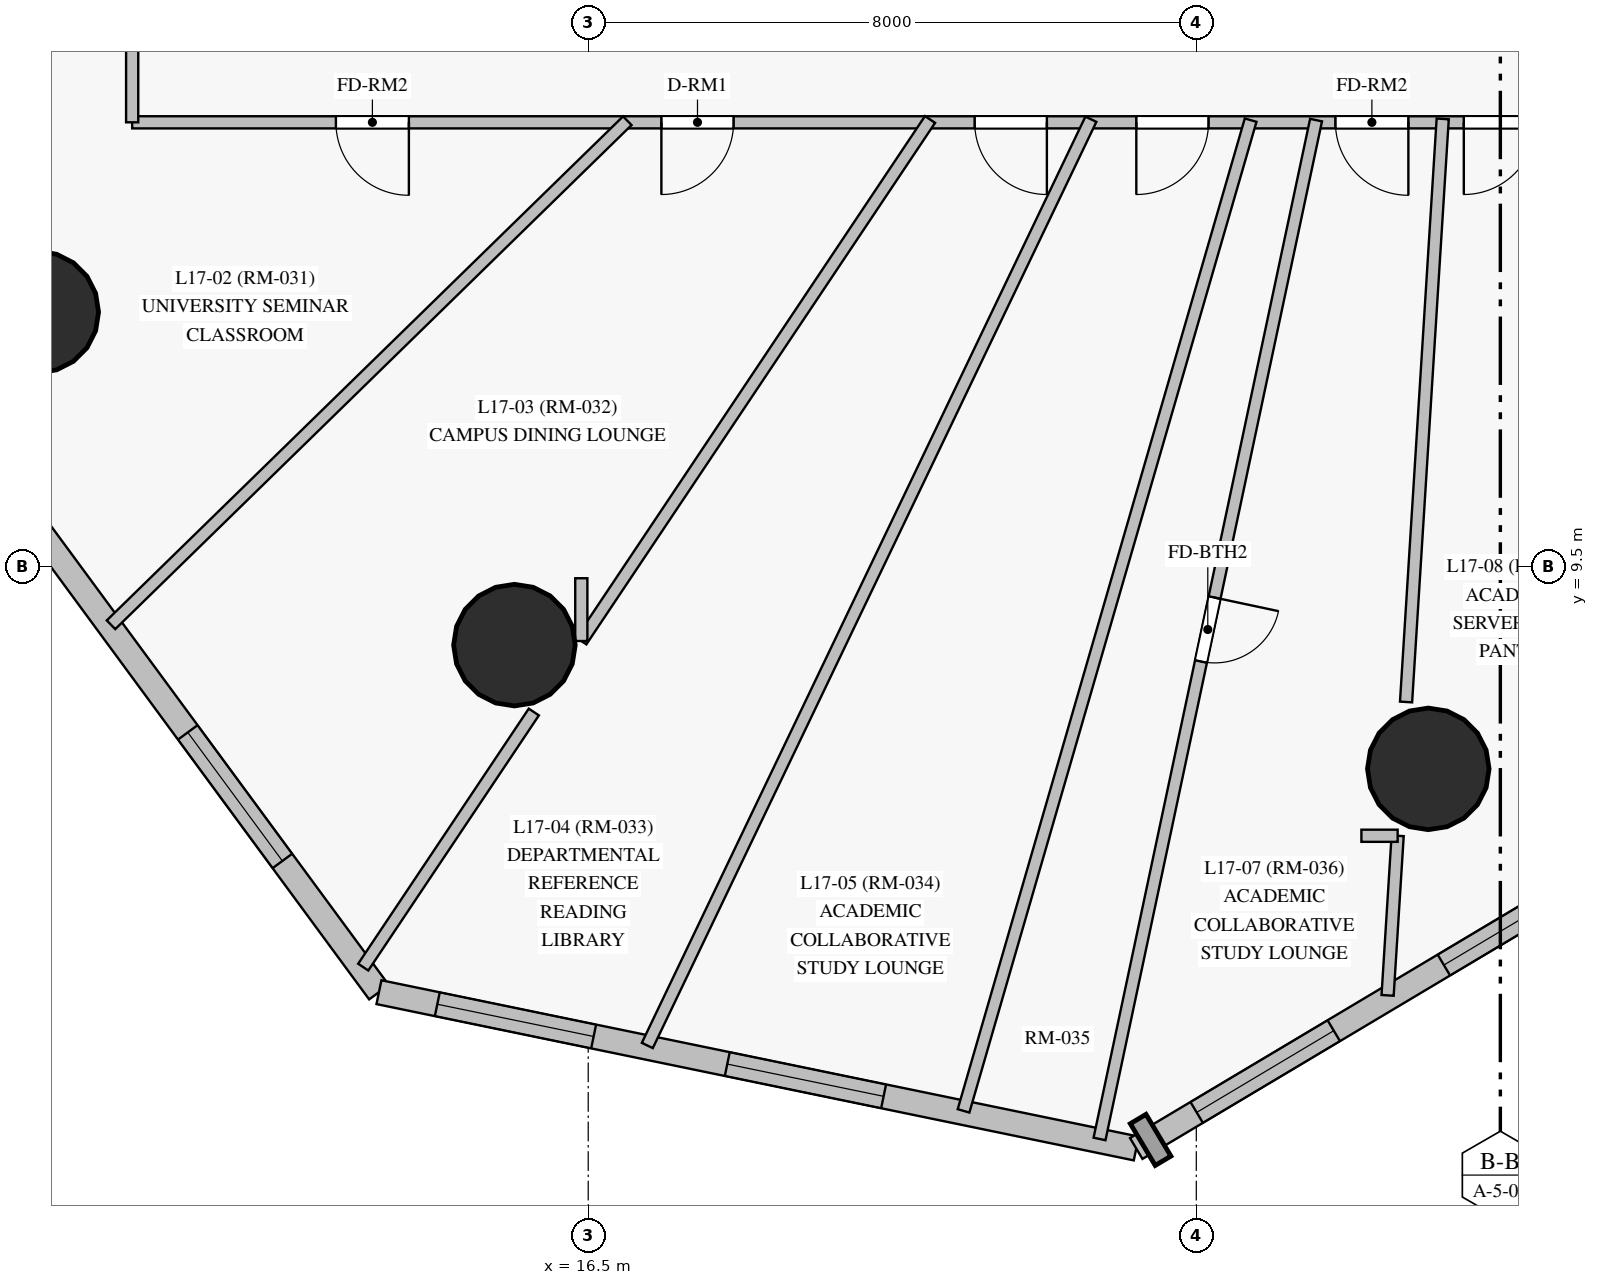
"""IFC4 building model, lengths in metres.
Left out: names, types, materials, properties, quantities, classifications, styles, units other than length and angle.
Written with IfcOpenShell. Run it as: python <this file> out.ifc"""

import sys

from ifc_helpers import new_model, si_unit, direction, frame, frame_2d, origin, origin_with_axes, origin_2d, place, context, subcontext, project, spatial, rectangle, circle, extrude, source, transform, mapped, element, fill, save


model = new_model("IFC4")
c1 = context("Model", 3, precision=1e-05, world=origin(), true_north=direction((0.0, 1.0)))
c2 = subcontext(c1, "Body", "Model", "MODEL_VIEW")
j1 = project(units=[si_unit("LENGTHUNIT", "METRE"), si_unit("PLANEANGLEUNIT", "RADIAN")], contexts=[c1])
p1 = place(None, origin())
s1 = spatial("IfcSite", under=j1, at=p1, CompositionType="ELEMENT")
p2 = place(p1, origin())
s2 = spatial("IfcBuilding", under=s1, at=p2, CompositionType="ELEMENT")
p3 = place(p2, frame((0.0, 0.0, 66.1)))
s3 = spatial("IfcBuildingStorey", under=s2, at=p3, CompositionType="ELEMENT", Elevation=66.1)
m1 = source(origin_with_axes(), c2, "Body", "SweptSolid", [
    extrude(circle(Radius=0.8, at=origin_2d()), origin(), (0.0, 0.0, 1.0), 3.6),
])
for number, where, z_axis, x_axis in (
    (1, (9.258, 12.854, 0.0), (0.0, 0.0, 1.0), (1.0, 0.0, 0.0)),
    (2, (15.529, 8.472, 0.0), (0.0, 0.0, 1.0), (1.0, 0.0, 0.0)),
    (3, (27.552, 6.844, 0.0), (0.0, 0.0, 1.0), (1.0, 0.0, 0.0)),
):
    element("IfcColumn", number, at=place(p3, frame(where, z_axis=z_axis, x_axis=x_axis)), inside=s3, PredefinedType="COLUMN", context=c2, shape_type="MappedRepresentation", body=[
        mapped(m1, transform((0.0, 0.0, 0.0), scale=1.0)),
    ])
p4 = place(p3, frame((6.235, 14.114, 0.0), z_axis=(0.0, 0.0, 1.0), x_axis=(0.59272320353, -0.805406235385, 0.0)))
e4 = element("IfcWall", 4, at=p4, inside=s3, PredefinedType="SOLIDWALL", context=c2, shape_type="SweptSolid", body=[
    extrude(rectangle(XDim=12.674, YDim=0.32, at=frame_2d((6.337, 0.0))), origin(), (0.0, 0.0, 1.0), 3.35),
])
p5 = place(p4, frame((2.323, 0.0, 0.85)))
e5 = element("IfcOpeningElement", 5, at=p5, cuts=e4, PredefinedType="OPENING", context=c2, shape_type="SweptSolid", body=[
    extrude(rectangle(XDim=2.1, YDim=1.95, at=frame_2d((1.05, 0.975))), frame((0.0, 0.17, 0.0), z_axis=(0.0, -1.0, 0.0), x_axis=(1.0, 0.0, 0.0)), (0.0, 0.0, 1.0), 0.34),
])
p6 = place(p4, frame((8.431, 0.0, 0.85)))
e6 = element("IfcOpeningElement", 6, at=p6, cuts=e4, PredefinedType="OPENING", context=c2, shape_type="SweptSolid", body=[
    extrude(rectangle(XDim=2.1, YDim=1.95, at=frame_2d((1.05, 0.975))), frame((0.0, 0.17, 0.0), z_axis=(0.0, -1.0, 0.0), x_axis=(1.0, 0.0, 0.0)), (0.0, 0.0, 1.0), 0.34),
])
p7 = place(p3, frame((13.747, 3.906, 0.0), z_axis=(0.0, 0.0, 1.0), x_axis=(0.979361436672, -0.202116739436, 0.0)))
e7 = element("IfcWall", 7, at=p7, inside=s3, PredefinedType="SOLIDWALL", context=c2, shape_type="SweptSolid", body=[
    extrude(rectangle(XDim=10.173, YDim=0.32, at=frame_2d((5.086, 0.0))), origin(), (0.0, 0.0, 1.0), 3.35),
])
p8 = place(p7, frame((0.784, 0.0, 0.85)))
e8 = element("IfcOpeningElement", 8, at=p8, cuts=e7, PredefinedType="OPENING", context=c2, shape_type="SweptSolid", body=[
    extrude(rectangle(XDim=2.1, YDim=1.95, at=frame_2d((1.05, 0.975))), frame((0.0, 0.17, 0.0), z_axis=(0.0, -1.0, 0.0), x_axis=(1.0, 0.0, 0.0)), (0.0, 0.0, 1.0), 0.34),
])
p9 = place(p7, frame((4.679, 0.0, 0.85)))
e9 = element("IfcOpeningElement", 9, at=p9, cuts=e7, PredefinedType="OPENING", context=c2, shape_type="SweptSolid", body=[
    extrude(rectangle(XDim=2.1, YDim=1.95, at=frame_2d((1.05, 0.975))), frame((0.0, 0.17, 0.0), z_axis=(0.0, -1.0, 0.0), x_axis=(1.0, 0.0, 0.0)), (0.0, 0.0, 1.0), 0.34),
])
p10 = place(p3, frame((23.71, 1.85, 0.0), z_axis=(0.0, 0.0, 1.0), x_axis=(0.858916766564, 0.512115209806, 0.0)))
e10 = element("IfcWall", 10, at=p10, inside=s3, PredefinedType="SOLIDWALL", context=c2, shape_type="SweptSolid", body=[
    extrude(rectangle(XDim=15.245, YDim=0.32, at=frame_2d((7.623, 0.0))), origin(), (0.0, 0.0, 1.0), 3.35),
])
p11 = place(p10, frame((0.926, 0.0, 0.85)))
e11 = element("IfcOpeningElement", 11, at=p11, cuts=e10, PredefinedType="OPENING", context=c2, shape_type="SweptSolid", body=[
    extrude(rectangle(XDim=2.1, YDim=1.95, at=frame_2d((1.05, 0.975))), frame((0.0, 0.17, 0.0), z_axis=(0.0, -1.0, 0.0), x_axis=(1.0, 0.0, 0.0)), (0.0, 0.0, 1.0), 0.34),
])
p12 = place(p10, frame((4.712, 0.0, 0.85)))
e12 = element("IfcOpeningElement", 12, at=p12, cuts=e10, PredefinedType="OPENING", context=c2, shape_type="SweptSolid", body=[
    extrude(rectangle(XDim=2.1, YDim=1.95, at=frame_2d((1.05, 0.975))), frame((0.0, 0.17, 0.0), z_axis=(0.0, -1.0, 0.0), x_axis=(1.0, 0.0, 0.0)), (0.0, 0.0, 1.0), 0.34),
])
p13 = place(p10, frame((8.631, 0.0, 0.85)))
e13 = element("IfcOpeningElement", 13, at=p13, cuts=e10, PredefinedType="OPENING", context=c2, shape_type="SweptSolid", body=[
    extrude(rectangle(XDim=2.1, YDim=1.95, at=frame_2d((1.05, 0.975))), frame((0.0, 0.17, 0.0), z_axis=(0.0, -1.0, 0.0), x_axis=(1.0, 0.0, 0.0)), (0.0, 0.0, 1.0), 0.34),
])
p14 = place(p10, frame((12.087, 0.0, 0.85)))
e14 = element("IfcOpeningElement", 14, at=p14, cuts=e10, PredefinedType="OPENING", context=c2, shape_type="SweptSolid", body=[
    extrude(rectangle(XDim=2.1, YDim=1.95, at=frame_2d((1.05, 0.975))), frame((0.0, 0.17, 0.0), z_axis=(0.0, -1.0, 0.0), x_axis=(1.0, 0.0, 0.0)), (0.0, 0.0, 1.0), 0.34),
])
p15 = place(p3, frame((40.25, 15.35, 0.0), z_axis=(0.0, 0.0, 1.0), x_axis=(-1.0, 0.0, 0.0)))
e15 = element("IfcWall", 15, at=p15, inside=s3, PredefinedType="PARTITIONING", context=c2, shape_type="SweptSolid", body=[
    extrude(rectangle(XDim=29.75, YDim=0.16, at=frame_2d((14.875, 0.0))), origin(), (0.0, 0.0, 1.0), 2.7),
])
p16 = place(p15, frame((26.11, 0.0, 0.0)))
e16 = element("IfcOpeningElement", 16, at=p16, cuts=e15, PredefinedType="OPENING", context=c2, shape_type="SweptSolid", body=[
    extrude(rectangle(XDim=0.96, YDim=2.15, at=frame_2d((0.48, 1.075))), frame((0.0, 0.09, 0.0), z_axis=(0.0, -1.0, 0.0), x_axis=(1.0, 0.0, 0.0)), (0.0, 0.0, 1.0), 0.18),
])
p17 = place(p15, frame((21.837, 0.0, 0.0)))
e17 = element("IfcOpeningElement", 17, at=p17, cuts=e15, PredefinedType="OPENING", context=c2, shape_type="SweptSolid", body=[
    extrude(rectangle(XDim=0.95, YDim=2.15, at=frame_2d((0.475, 1.075))), frame((0.0, 0.09, 0.0), z_axis=(0.0, -1.0, 0.0), x_axis=(1.0, 0.0, 0.0)), (0.0, 0.0, 1.0), 0.18),
])
p18 = place(p15, frame((17.716, 0.0, 0.0)))
e18 = element("IfcOpeningElement", 18, at=p18, cuts=e15, PredefinedType="OPENING", context=c2, shape_type="SweptSolid", body=[
    extrude(rectangle(XDim=0.95, YDim=2.15, at=frame_2d((0.475, 1.075))), frame((0.0, 0.09, 0.0), z_axis=(0.0, -1.0, 0.0), x_axis=(1.0, 0.0, 0.0)), (0.0, 0.0, 1.0), 0.18),
])
p19 = place(p15, frame((15.589, 0.0, 0.0)))
e19 = element("IfcOpeningElement", 19, at=p19, cuts=e15, PredefinedType="OPENING", context=c2, shape_type="SweptSolid", body=[
    extrude(rectangle(XDim=0.95, YDim=2.15, at=frame_2d((0.475, 1.075))), frame((0.0, 0.09, 0.0), z_axis=(0.0, -1.0, 0.0), x_axis=(1.0, 0.0, 0.0)), (0.0, 0.0, 1.0), 0.18),
])
p20 = place(p15, frame((12.96, 0.0, 0.0)))
e20 = element("IfcOpeningElement", 20, at=p20, cuts=e15, PredefinedType="OPENING", context=c2, shape_type="SweptSolid", body=[
    extrude(rectangle(XDim=0.96, YDim=2.15, at=frame_2d((0.48, 1.075))), frame((0.0, 0.09, 0.0), z_axis=(0.0, -1.0, 0.0), x_axis=(1.0, 0.0, 0.0)), (0.0, 0.0, 1.0), 0.18),
])
p21 = place(p15, frame((11.281, 0.0, 0.0)))
e21 = element("IfcOpeningElement", 21, at=p21, cuts=e15, PredefinedType="OPENING", context=c2, shape_type="SweptSolid", body=[
    extrude(rectangle(XDim=0.95, YDim=2.15, at=frame_2d((0.475, 1.075))), frame((0.0, 0.09, 0.0), z_axis=(0.0, -1.0, 0.0), x_axis=(1.0, 0.0, 0.0)), (0.0, 0.0, 1.0), 0.18),
])
p22 = place(p15, frame((9.601, 0.0, 0.0)))
e22 = element("IfcOpeningElement", 22, at=p22, cuts=e15, PredefinedType="OPENING", context=c2, shape_type="SweptSolid", body=[
    extrude(rectangle(XDim=0.96, YDim=2.15, at=frame_2d((0.48, 1.075))), frame((0.0, 0.09, 0.0), z_axis=(0.0, -1.0, 0.0), x_axis=(1.0, 0.0, 0.0)), (0.0, 0.0, 1.0), 0.18),
])
p23 = place(p15, frame((8.498, 0.0, 0.0)))
e23 = element("IfcOpeningElement", 23, at=p23, cuts=e15, PredefinedType="OPENING", context=c2, shape_type="SweptSolid", body=[
    extrude(rectangle(XDim=0.95, YDim=2.15, at=frame_2d((0.475, 1.075))), frame((0.0, 0.09, 0.0), z_axis=(0.0, -1.0, 0.0), x_axis=(1.0, 0.0, 0.0)), (0.0, 0.0, 1.0), 0.18),
])
p24 = place(p15, frame((2.634, 0.0, 0.0)))
e24 = element("IfcOpeningElement", 24, at=p24, cuts=e15, PredefinedType="OPENING", context=c2, shape_type="SweptSolid", body=[
    extrude(rectangle(XDim=0.95, YDim=2.15, at=frame_2d((0.475, 1.075))), frame((0.0, 0.09, 0.0), z_axis=(0.0, -1.0, 0.0), x_axis=(1.0, 0.0, 0.0)), (0.0, 0.0, 1.0), 0.18),
])
p25 = place(p3, frame((10.5, 15.35, 0.0), z_axis=(0.0, 0.0, 1.0), x_axis=(0.0, 1.0, 0.0)))
e25 = element("IfcWall", 25, at=p25, inside=s3, PredefinedType="PARTITIONING", context=c2, shape_type="SweptSolid", body=[
    extrude(rectangle(XDim=22.3, YDim=0.16, at=frame_2d((11.15, 0.0))), origin(), (0.0, 0.0, 1.0), 2.75),
])
p26 = place(p25, frame((7.33, 0.0, 0.0)))
e26 = element("IfcOpeningElement", 26, at=p26, cuts=e25, PredefinedType="OPENING", context=c2, shape_type="SweptSolid", body=[
    extrude(rectangle(XDim=0.95, YDim=2.15, at=frame_2d((0.475, 1.075))), frame((0.0, 0.09, 0.0), z_axis=(0.0, -1.0, 0.0), x_axis=(1.0, 0.0, 0.0)), (0.0, 0.0, 1.0), 0.18),
])
p27 = place(p25, frame((16.25, 0.0, 0.0)))
e27 = element("IfcOpeningElement", 27, at=p27, cuts=e25, PredefinedType="OPENING", context=c2, shape_type="SweptSolid", body=[
    extrude(rectangle(XDim=0.96, YDim=2.15, at=frame_2d((0.48, 1.075))), frame((0.0, 0.09, 0.0), z_axis=(0.0, -1.0, 0.0), x_axis=(1.0, 0.0, 0.0)), (0.0, 0.0, 1.0), 0.18),
])
p28 = place(p25, frame((10.675, 0.0, 0.0)))
e28 = element("IfcOpeningElement", 28, at=p28, cuts=e25, PredefinedType="OPENING", context=c2, shape_type="SweptSolid", body=[
    extrude(rectangle(XDim=0.95, YDim=2.15, at=frame_2d((0.475, 1.075))), frame((0.0, 0.09, 0.0), z_axis=(0.0, -1.0, 0.0), x_axis=(1.0, 0.0, 0.0)), (0.0, 0.0, 1.0), 0.18),
])
p29 = place(p3, frame((26.075, 15.379, 0.0), z_axis=(0.0, 0.0, 1.0), x_axis=(-0.207877719797, -0.978154820881, 0.0)))
e29 = element("IfcWall", 29, at=p29, inside=s3, PredefinedType="PARTITIONING", context=c2, shape_type="SweptSolid", body=[
    extrude(rectangle(XDim=13.703, YDim=0.16, at=frame_2d((6.852, 0.0))), origin(), (0.0, 0.0, 1.0), 3.35),
])
p30 = place(p29, frame((6.422, 0.0, 0.0)))
e30 = element("IfcOpeningElement", 30, at=p30, cuts=e29, PredefinedType="OPENING", context=c2, shape_type="SweptSolid", body=[
    extrude(rectangle(XDim=0.86, YDim=2.04, at=frame_2d((0.43, 1.02))), frame((0.0, 0.09, 0.0), z_axis=(0.0, -1.0, 0.0), x_axis=(1.0, 0.0, 0.0)), (0.0, 0.0, 1.0), 0.18),
])
p31 = place(p3, frame((25.215, 15.379, 0.0), z_axis=(0.0, 0.0, 1.0), x_axis=(-0.278333270269, -0.960484560345, 0.0)))
e31 = element("IfcWall", 31, at=p31, inside=s3, PredefinedType="PARTITIONING", context=c2, shape_type="SweptSolid", body=[
    extrude(rectangle(XDim=13.57, YDim=0.16, at=frame_2d((6.785, 0.0))), origin(), (0.0, 0.0, 1.0), 3.35),
])
p32 = place(p3, frame((23.113, 15.391, 0.0), z_axis=(0.0, 0.0, 1.0), x_axis=(-0.431926675658, -0.901908724237, 0.0)))
e32 = element("IfcWall", 32, at=p32, inside=s3, PredefinedType="PARTITIONING", context=c2, shape_type="SweptSolid", body=[
    extrude(rectangle(XDim=13.511, YDim=0.16, at=frame_2d((6.755, 0.0))), origin(), (0.0, 0.0, 1.0), 3.35),
])
p33 = place(p3, frame((17.014, 15.371, 0.0), z_axis=(0.0, 0.0, 1.0), x_axis=(-0.715555534785, -0.698555850765, 0.0)))
e33 = element("IfcWall", 33, at=p33, inside=s3, PredefinedType="PARTITIONING", context=c2, shape_type="SweptSolid", body=[
    extrude(rectangle(XDim=9.493, YDim=0.16, at=frame_2d((4.747, 0.0))), origin(), (0.0, 0.0, 1.0), 3.35),
])
p34 = place(p3, frame((20.997, 15.387, 0.0), z_axis=(0.0, 0.0, 1.0), x_axis=(-0.555846420045, -0.831285003668, 0.0)))
e34 = element("IfcWall", 34, at=p34, inside=s3, PredefinedType="PARTITIONING", context=c2, shape_type="SweptSolid", body=[
    extrude(rectangle(XDim=8.254, YDim=0.16, at=frame_2d((4.127, 0.0))), origin(), (0.0, 0.0, 1.0), 3.35),
])
p35 = place(p3, frame((27.742, 15.395, 0.0), z_axis=(0.0, 0.0, 1.0), x_axis=(-0.062734238662, -0.998030267727, 0.0)))
e35 = element("IfcWall", 35, at=p35, inside=s3, PredefinedType="PARTITIONING", context=c2, shape_type="SweptSolid", body=[
    extrude(rectangle(XDim=7.686, YDim=0.16, at=frame_2d((3.843, 0.0))), origin(), (0.0, 0.0, 1.0), 2.7),
])
p36 = place(p3, frame((10.527, 17.864, 0.0), z_axis=(0.0, 0.0, 1.0), x_axis=(-0.900033897649, -0.43581989753, 0.0)))
e36 = element("IfcWall", 36, at=p36, inside=s3, PredefinedType="PARTITIONING", context=c2, shape_type="SweptSolid", body=[
    extrude(rectangle(XDim=4.953, YDim=0.16, at=frame_2d((2.476, 0.0))), origin(), (0.0, 0.0, 1.0), 3.35),
])
p37 = place(p3, frame((15.784, 7.592, 0.0), z_axis=(0.0, 0.0, 1.0), x_axis=(-0.555885742986, -0.831258708673, 0.0)))
e37 = element("IfcWall", 37, at=p37, inside=s3, PredefinedType="PARTITIONING", context=c2, shape_type="SweptSolid", body=[
    extrude(rectangle(XDim=4.038, YDim=0.16, at=frame_2d((2.019, 0.0))), origin(), (0.0, 0.0, 1.0), 3.35),
])
p38 = place(p3, frame((27.149, 5.964, 0.0), z_axis=(0.0, 0.0, 1.0), x_axis=(-0.062768334695, -0.998028123932, 0.0)))
e38 = element("IfcWall", 38, at=p38, inside=s3, PredefinedType="PARTITIONING", context=c2, shape_type="SweptSolid", body=[
    extrude(rectangle(XDim=2.104, YDim=0.16, at=frame_2d((1.052, 0.0))), origin(), (0.0, 0.0, 1.0), 3.35),
])
p39 = place(p3, frame((16.409, 8.526, 0.0), z_axis=(0.0, 0.0, 1.0), x_axis=(0.0, 1.0, 0.0)))
e39 = element("IfcWall", 39, at=p39, inside=s3, PredefinedType="PARTITIONING", context=c2, shape_type="SweptSolid", body=[
    extrude(rectangle(XDim=0.826, YDim=0.16, at=frame_2d((0.413, 0.0))), origin(), (0.0, 0.0, 1.0), 2.7),
])
p40 = place(p3, frame((26.672, 5.964, 0.0), z_axis=(0.0, 0.0, 1.0), x_axis=(1.0, 0.0, 0.0)))
e40 = element("IfcWall", 40, at=p40, inside=s3, PredefinedType="PARTITIONING", context=c2, shape_type="SweptSolid", body=[
    extrude(rectangle(XDim=0.477, YDim=0.16, at=frame_2d((0.238, 0.0))), origin(), (0.0, 0.0, 1.0), 3.35),
])
m2 = source(origin_with_axes(), c2, "Body", "SweptSolid", [
    extrude(rectangle(XDim=2.1, YDim=1.95, at=frame_2d((1.05, 0.975))), frame((0.0, 0.03, 0.0), z_axis=(0.0, -1.0, 0.0), x_axis=(1.0, 0.0, 0.0)), (0.0, 0.0, 1.0), 0.06),
])
p41 = place(p6, origin())
e41 = element("IfcWindow", 41, at=p41, inside=s3, PartitioningType="SINGLE_PANEL", PredefinedType="WINDOW", context=c2, shape_type="MappedRepresentation", body=[
    mapped(m2, transform((0.0, 0.0, 0.0), scale=1.0)),
])
fill(e6, e41)
p42 = place(p8, origin())
e42 = element("IfcWindow", 42, at=p42, inside=s3, PartitioningType="SINGLE_PANEL", PredefinedType="WINDOW", context=c2, shape_type="MappedRepresentation", body=[
    mapped(m2, transform((0.0, 0.0, 0.0), scale=1.0)),
])
fill(e8, e42)
p43 = place(p9, origin())
e43 = element("IfcWindow", 43, at=p43, inside=s3, PartitioningType="SINGLE_PANEL", PredefinedType="WINDOW", context=c2, shape_type="MappedRepresentation", body=[
    mapped(m2, transform((0.0, 0.0, 0.0), scale=1.0)),
])
fill(e9, e43)
p44 = place(p11, origin())
e44 = element("IfcWindow", 44, at=p44, inside=s3, PartitioningType="SINGLE_PANEL", PredefinedType="WINDOW", context=c2, shape_type="MappedRepresentation", body=[
    mapped(m2, transform((0.0, 0.0, 0.0), scale=1.0)),
])
fill(e11, e44)
p45 = place(p12, origin())
e45 = element("IfcWindow", 45, at=p45, inside=s3, PartitioningType="SINGLE_PANEL", PredefinedType="WINDOW", context=c2, shape_type="MappedRepresentation", body=[
    mapped(m2, transform((0.0, 0.0, 0.0), scale=1.0)),
])
fill(e12, e45)
m3 = source(origin_with_axes(), c2, "Body", "SweptSolid", [
    extrude(rectangle(XDim=0.96, YDim=2.15, at=frame_2d((0.48, 1.075))), frame((0.0, 0.025, 0.0), z_axis=(0.0, -1.0, 0.0), x_axis=(1.0, 0.0, 0.0)), (0.0, 0.0, 1.0), 0.05),
])
p46 = place(p16, origin())
e46 = element("IfcDoor", 46, at=p46, inside=s3, OperationType="SINGLE_SWING_LEFT", PredefinedType="DOOR", context=c2, shape_type="MappedRepresentation", body=[
    mapped(m3, transform((0.0, 0.0, 0.0), scale=1.0)),
])
fill(e16, e46)
m4 = source(origin_with_axes(), c2, "Body", "SweptSolid", [
    extrude(rectangle(XDim=0.95, YDim=2.15, at=frame_2d((0.475, 1.075))), frame((0.0, 0.025, 0.0), z_axis=(0.0, -1.0, 0.0), x_axis=(1.0, 0.0, 0.0)), (0.0, 0.0, 1.0), 0.05),
])
p47 = place(p17, origin())
e47 = element("IfcDoor", 47, at=p47, inside=s3, OperationType="SINGLE_SWING_RIGHT", PredefinedType="DOOR", context=c2, shape_type="MappedRepresentation", body=[
    mapped(m4, transform((0.0, 0.0, 0.0), scale=1.0)),
])
fill(e17, e47)
p48 = place(p18, origin())
e48 = element("IfcDoor", 48, at=p48, inside=s3, OperationType="SINGLE_SWING_LEFT", PredefinedType="DOOR", context=c2, shape_type="MappedRepresentation", body=[
    mapped(m4, transform((0.0, 0.0, 0.0), scale=1.0)),
])
fill(e18, e48)
p49 = place(p19, origin())
e49 = element("IfcDoor", 49, at=p49, inside=s3, OperationType="SINGLE_SWING_RIGHT", PredefinedType="DOOR", context=c2, shape_type="MappedRepresentation", body=[
    mapped(m4, transform((0.0, 0.0, 0.0), scale=1.0)),
])
fill(e19, e49)
p50 = place(p20, origin())
e50 = element("IfcDoor", 50, at=p50, inside=s3, OperationType="SINGLE_SWING_LEFT", PredefinedType="DOOR", context=c2, shape_type="MappedRepresentation", body=[
    mapped(m3, transform((0.0, 0.0, 0.0), scale=1.0)),
])
fill(e20, e50)
p51 = place(p21, origin())
e51 = element("IfcDoor", 51, at=p51, inside=s3, OperationType="SINGLE_SWING_RIGHT", PredefinedType="DOOR", context=c2, shape_type="MappedRepresentation", body=[
    mapped(m4, transform((0.0, 0.0, 0.0), scale=1.0)),
])
fill(e21, e51)
m5 = source(origin_with_axes(), c2, "Body", "SweptSolid", [
    extrude(rectangle(XDim=0.86, YDim=2.04, at=frame_2d((0.43, 1.02))), frame((0.0, 0.025, 0.0), z_axis=(0.0, -1.0, 0.0), x_axis=(1.0, 0.0, 0.0)), (0.0, 0.0, 1.0), 0.05),
])
p52 = place(p30, origin())
e52 = element("IfcDoor", 52, at=p52, inside=s3, OperationType="SINGLE_SWING_LEFT", PredefinedType="DOOR", context=c2, shape_type="MappedRepresentation", body=[
    mapped(m5, transform((0.0, 0.0, 0.0), scale=1.0)),
])
fill(e30, e52)
save(model, sys.argv[1])
